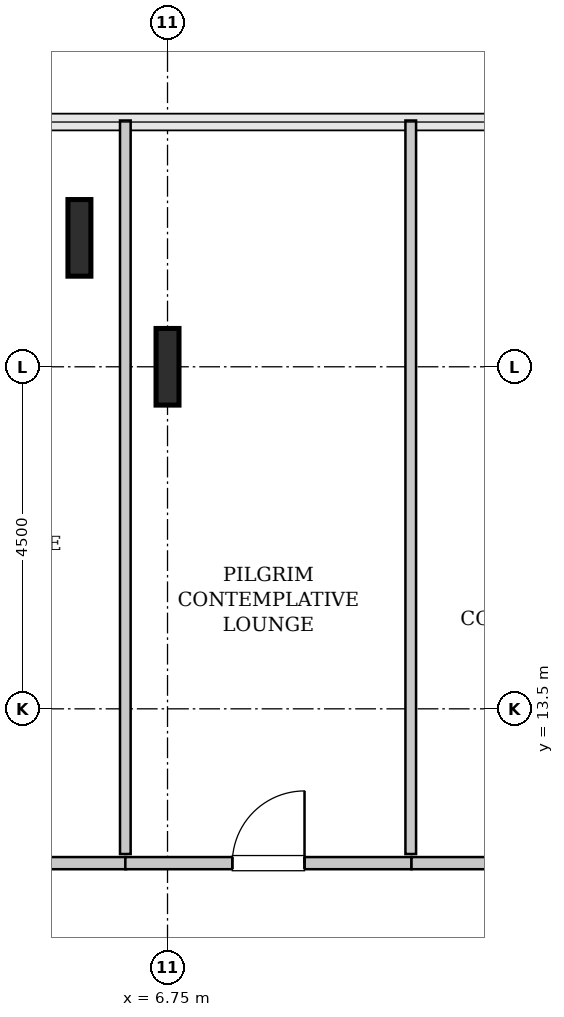
"""IFC4 building model, lengths in metres.
Left out: names, types, materials, properties, quantities, classifications, styles, units other than length and angle.
Written with IfcOpenShell. Run it as: python <this file> out.ifc"""

import sys

from ifc_helpers import new_model, si_unit, direction, frame, frame_2d, origin, origin_2d, place, context, subcontext, project, spatial, rectangle, i_section, extrude, source, transform, mapped, element, fill, save


model = new_model("IFC4")
c1 = context("Model", 3, precision=1e-05, world=origin(), true_north=direction((0.0, 1.0)))
c2 = subcontext(c1, "Body", "Model", "MODEL_VIEW")
j1 = project(units=[si_unit("LENGTHUNIT", "METRE"), si_unit("PLANEANGLEUNIT", "RADIAN")], contexts=[c1])
p1 = place(None, origin())
s1 = spatial("IfcSite", under=j1, at=p1, CompositionType="ELEMENT")
p2 = place(p1, origin())
s2 = spatial("IfcBuilding", under=s1, at=p2, CompositionType="ELEMENT")
p3 = place(p2, frame((0.0, 0.0, 121.2)))
s3 = spatial("IfcBuildingStorey", under=s2, at=p3, CompositionType="ELEMENT", Elevation=121.2)
m1 = source(origin(), c2, "Body", "SweptSolid", [
    extrude(i_section(OverallWidth=0.302, OverallDepth=1.008, WebThickness=0.021, FlangeThickness=0.04, FilletRadius=0.03, at=origin_2d()), origin(), (0.0, 0.0, 1.0), 3.8),
])
for number, where, z_axis, x_axis in (
    (1, (5.591, 19.696, 0.0), (0.0, 0.0, 1.0), (1.0, 0.0, 0.0)),
    (2, (6.75, 18.0, 0.0), (0.0, 0.0, 1.0), (1.0, 0.0, 0.0)),
):
    element("IfcColumn", number, at=place(p3, frame(where, z_axis=z_axis, x_axis=x_axis)), inside=s3, PredefinedType="COLUMN", context=c2, shape_type="MappedRepresentation", body=[
        mapped(m1, transform((0.0, 0.0, 0.0), x_axis=(1.0, 0.0, 0.0), y_axis=(0.0, 1.0, 0.0), z_axis=(0.0, 0.0, 1.0), scale=1.0)),
    ])
m2 = source(origin(), c2, "Body", "SweptSolid", [
    extrude(rectangle(XDim=4.005, YDim=0.16, at=frame_2d((2.002, 0.0))), origin(), (0.0, 0.0, 1.0), 3.535),
])
p4 = place(p3, frame((2.2, 11.47, 0.0), z_axis=(0.0, 0.0, 1.0), x_axis=(1.0, 0.0, 0.0)))
e3 = element("IfcWall", 3, at=p4, inside=s3, PredefinedType="PARTITIONING", context=c2, shape_type="MappedRepresentation", body=[
    mapped(m2, transform((0.0, 0.0, 0.0), x_axis=(1.0, 0.0, 0.0), y_axis=(0.0, 1.0, 0.0), z_axis=(0.0, 0.0, 1.0), scale=1.0)),
])
p5 = place(p4, frame((1.528, 0.0, 0.0)))
e4 = element("IfcOpeningElement", 4, at=p5, cuts=e3, PredefinedType="OPENING", context=c2, shape_type="SweptSolid", body=[
    extrude(rectangle(XDim=0.95, YDim=2.1, at=frame_2d((0.475, 1.05))), frame((0.0, 0.09, 0.0), z_axis=(0.0, -1.0, 0.0), x_axis=(1.0, 0.0, 0.0)), (0.0, 0.0, 1.0), 0.18),
])
m3 = source(origin(), c2, "Body", "SweptSolid", [
    extrude(rectangle(XDim=9.65, YDim=0.14, at=frame_2d((4.825, 0.0))), origin(), (0.0, 0.0, 1.0), 3.535),
])
p6 = place(p3, frame((6.195, 11.59, 0.0), z_axis=(0.0, 0.0, 1.0), x_axis=(0.0, 1.0, 0.0)))
e5 = element("IfcWall", 5, at=p6, inside=s3, PredefinedType="PARTITIONING", context=c2, shape_type="MappedRepresentation", body=[
    mapped(m3, transform((0.0, 0.0, 0.0), x_axis=(1.0, 0.0, 0.0), y_axis=(0.0, 1.0, 0.0), z_axis=(0.0, 0.0, 1.0), scale=1.0)),
])
m4 = source(origin(), c2, "Body", "SweptSolid", [
    extrude(rectangle(XDim=3.765, YDim=0.16, at=frame_2d((1.882, 0.0))), origin(), (0.0, 0.0, 1.0), 3.535),
])
p7 = place(p3, frame((6.195, 11.47, 0.0), z_axis=(0.0, 0.0, 1.0), x_axis=(1.0, 0.0, 0.0)))
e6 = element("IfcWall", 6, at=p7, inside=s3, PredefinedType="PARTITIONING", context=c2, shape_type="MappedRepresentation", body=[
    mapped(m4, transform((0.0, 0.0, 0.0), x_axis=(1.0, 0.0, 0.0), y_axis=(0.0, 1.0, 0.0), z_axis=(0.0, 0.0, 1.0), scale=1.0)),
])
p8 = place(p7, frame((1.407, 0.0, 0.0)))
e7 = element("IfcOpeningElement", 7, at=p8, cuts=e6, PredefinedType="OPENING", context=c2, shape_type="SweptSolid", body=[
    extrude(rectangle(XDim=0.95, YDim=2.1, at=frame_2d((0.475, 1.05))), frame((0.0, 0.09, 0.0), z_axis=(0.0, -1.0, 0.0), x_axis=(1.0, 0.0, 0.0)), (0.0, 0.0, 1.0), 0.18),
])
p9 = place(p3, frame((9.95, 11.59, 0.0), z_axis=(0.0, 0.0, 1.0), x_axis=(0.0, 1.0, 0.0)))
e8 = element("IfcWall", 8, at=p9, inside=s3, PredefinedType="PARTITIONING", context=c2, shape_type="MappedRepresentation", body=[
    mapped(m3, transform((0.0, 0.0, 0.0), x_axis=(1.0, 0.0, 0.0), y_axis=(0.0, 1.0, 0.0), z_axis=(0.0, 0.0, 1.0), scale=1.0)),
])
m5 = source(origin(), c2, "Body", "SweptSolid", [
    extrude(rectangle(XDim=3.66, YDim=0.16, at=frame_2d((1.83, 0.0))), origin(), (0.0, 0.0, 1.0), 3.535),
])
p10 = place(p3, frame((9.96, 11.47, 0.0), z_axis=(0.0, 0.0, 1.0), x_axis=(1.0, 0.0, 0.0)))
e9 = element("IfcWall", 9, at=p10, inside=s3, PredefinedType="PARTITIONING", context=c2, shape_type="MappedRepresentation", body=[
    mapped(m5, transform((0.0, 0.0, 0.0), x_axis=(1.0, 0.0, 0.0), y_axis=(0.0, 1.0, 0.0), z_axis=(0.0, 0.0, 1.0), scale=1.0)),
])
p11 = place(p10, frame((1.355, 0.0, 0.0)))
e10 = element("IfcOpeningElement", 10, at=p11, cuts=e9, PredefinedType="OPENING", context=c2, shape_type="SweptSolid", body=[
    extrude(rectangle(XDim=0.95, YDim=2.1, at=frame_2d((0.475, 1.05))), frame((0.0, 0.09, 0.0), z_axis=(0.0, -1.0, 0.0), x_axis=(1.0, 0.0, 0.0)), (0.0, 0.0, 1.0), 0.18),
])
m6 = source(origin(), c2, "Body", "SweptSolid", [
    extrude(rectangle(XDim=0.95, YDim=2.1, at=frame_2d((0.475, 1.05))), frame((0.0, 0.025, 0.0), z_axis=(0.0, -1.0, 0.0), x_axis=(1.0, 0.0, 0.0)), (0.0, 0.0, 1.0), 0.05),
])
p12 = place(p8, origin())
e11 = element("IfcDoor", 11, at=p12, inside=s3, OperationType="SINGLE_SWING_RIGHT", PredefinedType="DOOR", context=c2, shape_type="MappedRepresentation", body=[
    mapped(m6, transform((0.0, 0.0, 0.0), x_axis=(1.0, 0.0, 0.0), y_axis=(0.0, 1.0, 0.0), z_axis=(0.0, 0.0, 1.0), scale=1.0)),
])
fill(e7, e11)
save(model, sys.argv[1])
